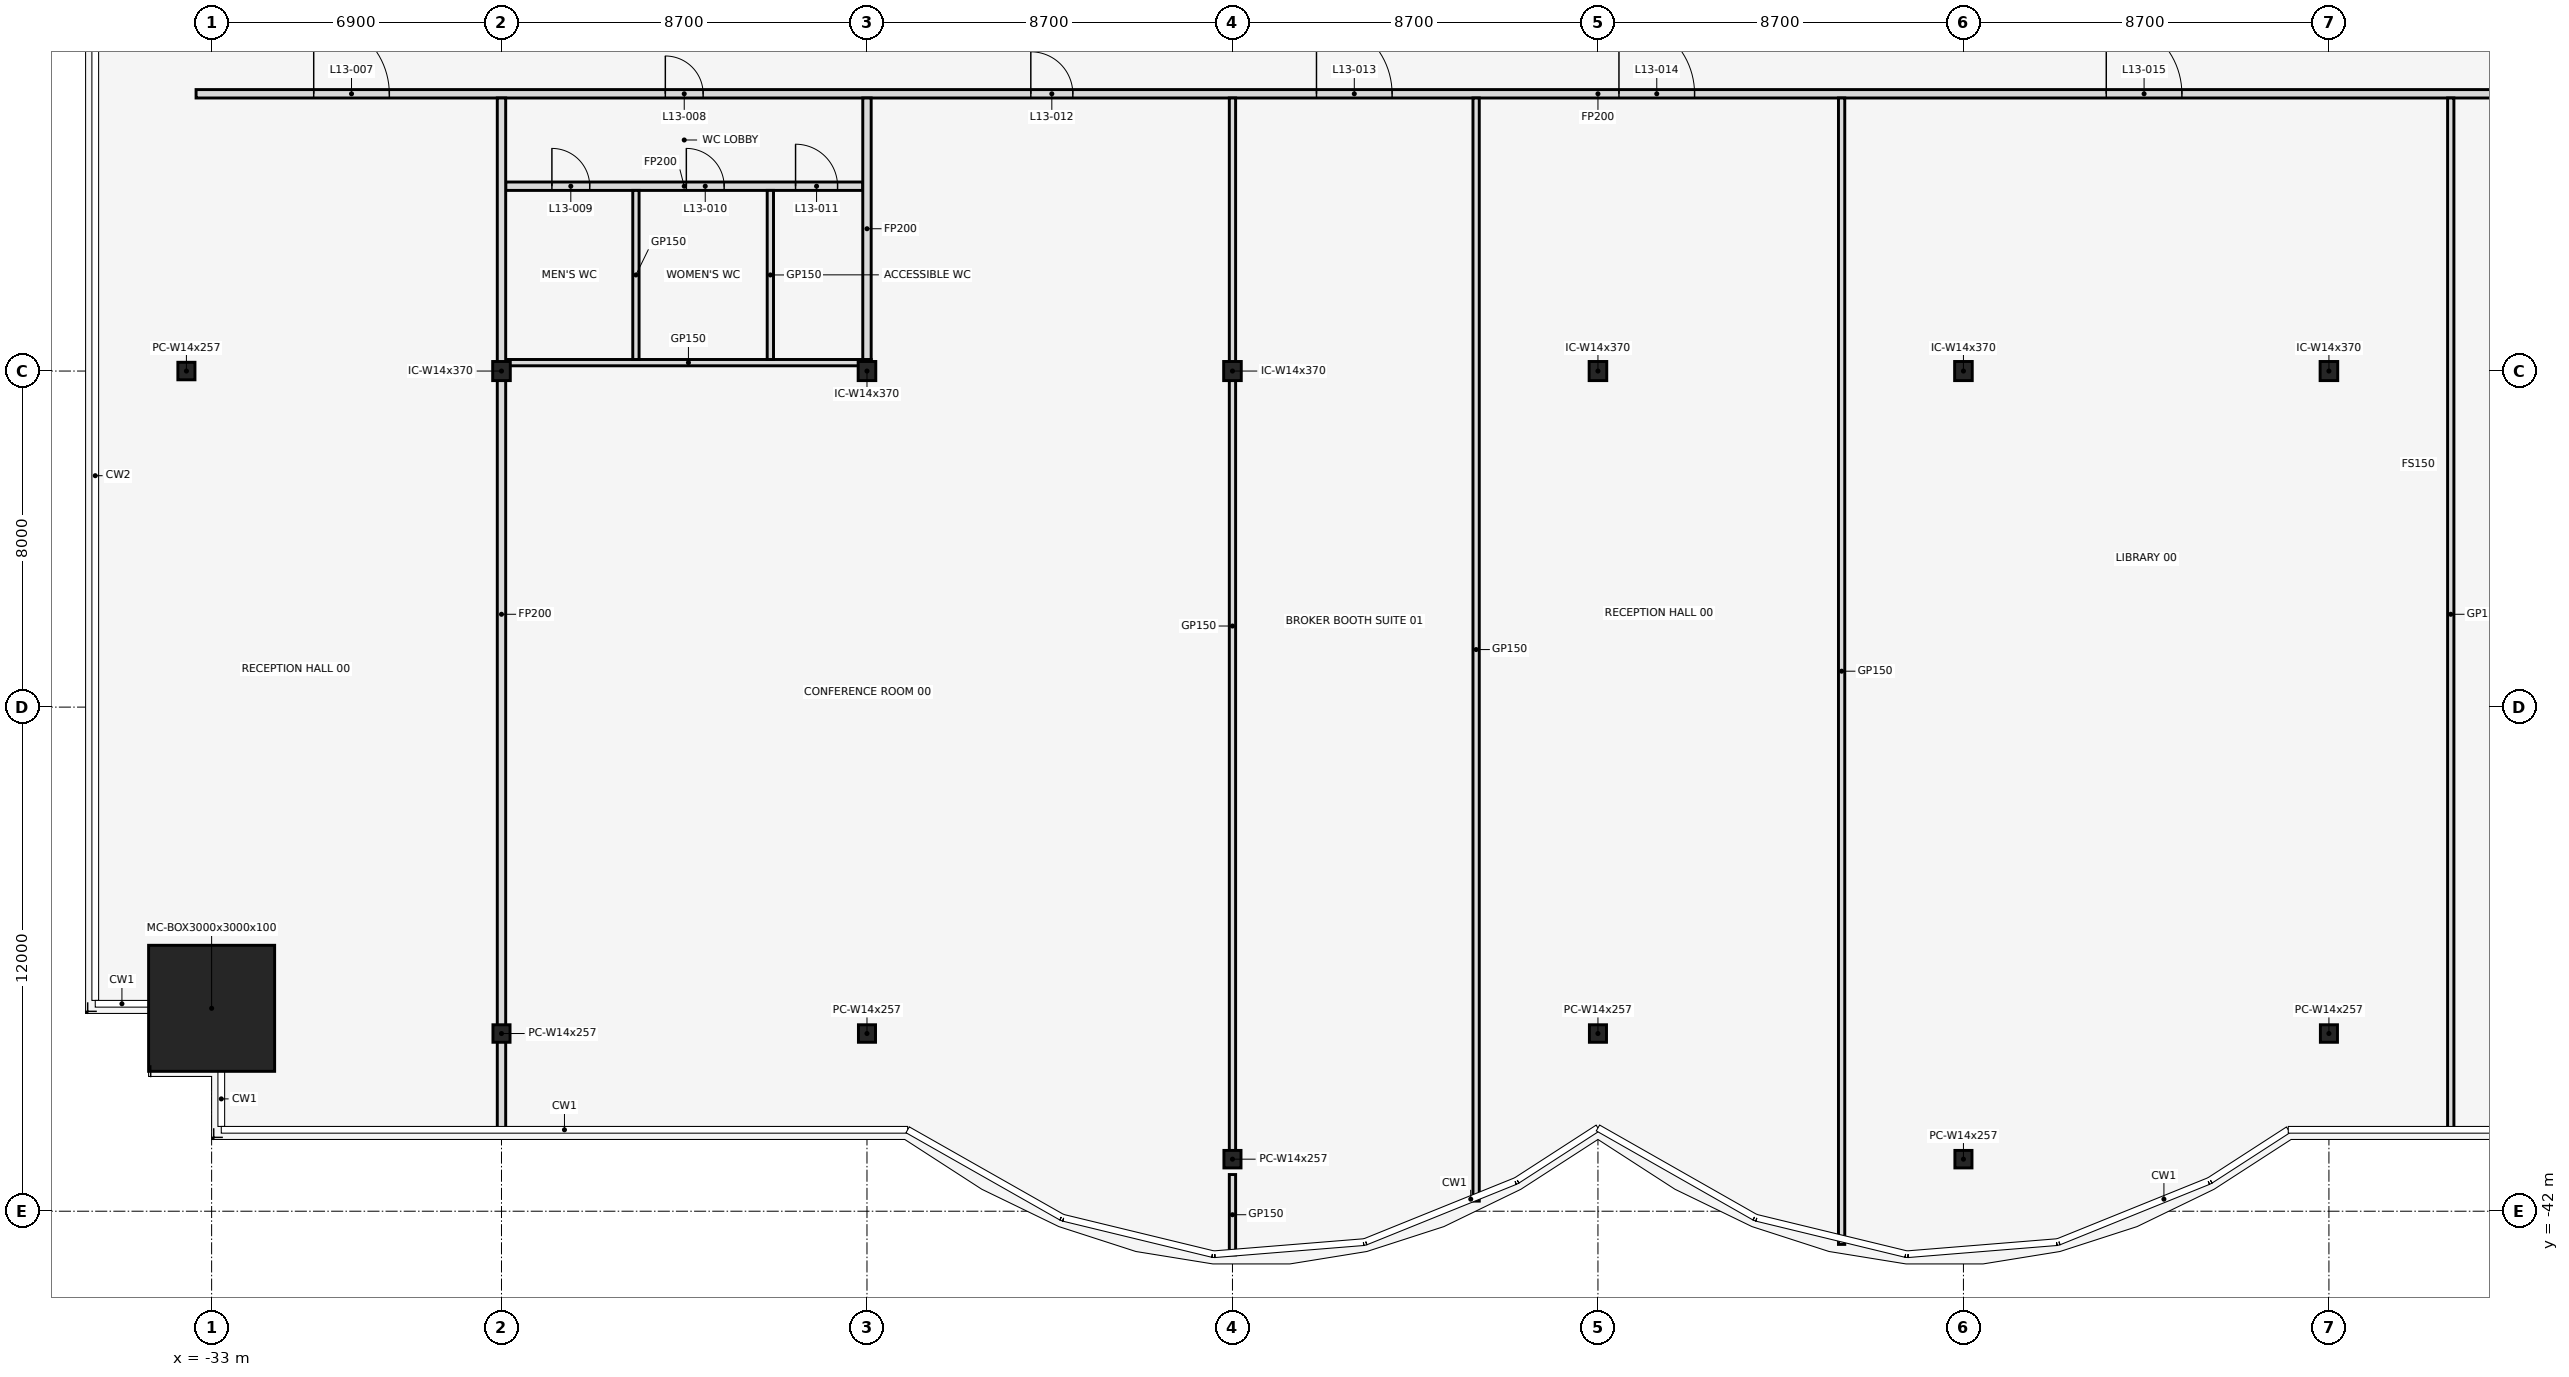
"""IFC4 building model, lengths in metres.
Left out: names, types, materials, properties, quantities, classifications, styles, units other than length and angle.
Written with IfcOpenShell. Run it as: python <this file> out.ifc"""

import sys

from ifc_helpers import new_model, si_unit, direction, frame, frame_2d, origin, origin_2d, place, context, subcontext, project, spatial, rectangle, hollow_rectangle, i_section, extrude, element, fill, save


model = new_model("IFC4")
c1 = context("Model", 3, precision=1e-05, world=origin(), true_north=direction((0.0, 1.0)))
c2 = subcontext(c1, "Body", "Model", "MODEL_VIEW")
j1 = project(units=[si_unit("LENGTHUNIT", "METRE"), si_unit("PLANEANGLEUNIT", "RADIAN")], contexts=[c1])
p1 = place(None, origin())
s1 = spatial("IfcSite", under=j1, at=p1, CompositionType="ELEMENT")
p2 = place(p1, origin())
s2 = spatial("IfcBuilding", under=s1, at=p2, CompositionType="ELEMENT")
p3 = place(p2, frame((0.0, 0.0, 66.5)))
s3 = spatial("IfcBuildingStorey", under=s2, at=p3, CompositionType="ELEMENT", Elevation=66.5)
p4 = place(p3, frame((-33.0, -37.17, 0.0), z_axis=(0.0, 0.0, 1.0), x_axis=(1.0, 0.0, 0.0)))
e1 = element("IfcColumn", 1, at=p4, inside=s3, PredefinedType="COLUMN", context=c2, shape_type="SweptSolid", body=[
    extrude(hollow_rectangle(XDim=3.0, YDim=3.0, WallThickness=0.1, at=origin_2d()), origin(), (0.0, 0.0, 1.0), 4.5),
])
for number, where, z_axis, x_axis in (
    (2, (-26.1, -37.77, 0.0), (0.0, 0.0, 1.0), (1.0, 0.0, 0.0)),
    (3, (-17.4, -37.77, 0.0), (0.0, 0.0, 1.0), (1.0, 0.0, 0.0)),
    (4, (-8.7, -40.761, 0.0), (0.0, 0.0, 1.0), (1.0, 0.0, 0.0)),
    (5, (0.0, -37.77, 0.0), (0.0, 0.0, 1.0), (1.0, 0.0, 0.0)),
    (6, (8.7, -40.761, 0.0), (0.0, 0.0, 1.0), (1.0, 0.0, 0.0)),
    (7, (17.4, -37.77, 0.0), (0.0, 0.0, 1.0), (1.0, 0.0, 0.0)),
    (8, (-33.6, -22.0, 0.0), (0.0, 0.0, 1.0), (1.0, 0.0, 0.0)),
):
    element("IfcColumn", number, at=place(p3, frame(where, z_axis=z_axis, x_axis=x_axis)), inside=s3, PredefinedType="COLUMN", context=c2, shape_type="SweptSolid", body=[
        extrude(i_section(OverallWidth=0.406, OverallDepth=0.417, WebThickness=0.03, FlangeThickness=0.048, at=origin_2d()), origin(), (0.0, 0.0, 1.0), 4.5),
    ])
for number, where, z_axis, x_axis in (
    (9, (-26.1, -22.0, 0.0), (0.0, 0.0, 1.0), (1.0, 0.0, 0.0)),
    (10, (-17.4, -22.0, 0.0), (0.0, 0.0, 1.0), (1.0, 0.0, 0.0)),
    (11, (-8.7, -22.0, 0.0), (0.0, 0.0, 1.0), (1.0, 0.0, 0.0)),
    (12, (0.0, -22.0, 0.0), (0.0, 0.0, 1.0), (1.0, 0.0, 0.0)),
    (13, (8.7, -22.0, 0.0), (0.0, 0.0, 1.0), (1.0, 0.0, 0.0)),
    (14, (17.4, -22.0, 0.0), (0.0, 0.0, 1.0), (1.0, 0.0, 0.0)),
):
    element("IfcColumn", number, at=place(p3, frame(where, z_axis=z_axis, x_axis=x_axis)), inside=s3, PredefinedType="COLUMN", context=c2, shape_type="SweptSolid", body=[
        extrude(i_section(OverallWidth=0.419, OverallDepth=0.455, WebThickness=0.042, FlangeThickness=0.068, at=origin_2d()), origin(), (0.0, 0.0, 1.0), 4.5),
    ])
p5 = place(p3, frame((-26.0, -21.8, 0.0), z_axis=(0.0, 0.0, 1.0), x_axis=(1.0, 0.0, 0.0)))
e15 = element("IfcWall", 15, at=p5, inside=s3, PredefinedType="PARTITIONING", context=c2, shape_type="SweptSolid", body=[
    extrude(rectangle(XDim=8.7, YDim=0.15, at=frame_2d((4.35, 0.0))), origin(), (0.0, 0.0, 1.0), 3.418),
])
p6 = place(p3, frame((-26.0, -17.6, 0.0), z_axis=(0.0, 0.0, 1.0), x_axis=(1.0, 0.0, 0.0)))
e16 = element("IfcWall", 16, at=p6, inside=s3, PredefinedType="PARTITIONING", context=c2, shape_type="SweptSolid", body=[
    extrude(rectangle(XDim=8.5, YDim=0.2, at=frame_2d((4.25, 0.0))), origin(), (0.0, 0.0, 1.0), 3.418),
])
p7 = place(p6, frame((1.1, 0.0, 0.0)))
e17 = element("IfcOpeningElement", 17, at=p7, cuts=e16, PredefinedType="OPENING", context=c2, shape_type="SweptSolid", body=[
    extrude(rectangle(XDim=0.9, YDim=2.1, at=frame_2d((0.45, 1.05))), frame((0.0, 0.112, 0.0), z_axis=(0.0, -1.0, 0.0), x_axis=(1.0, 0.0, 0.0)), (0.0, 0.0, 1.0), 0.224),
])
p8 = place(p6, frame((4.3, 0.0, 0.0)))
e18 = element("IfcOpeningElement", 18, at=p8, cuts=e16, PredefinedType="OPENING", context=c2, shape_type="SweptSolid", body=[
    extrude(rectangle(XDim=0.9, YDim=2.1, at=frame_2d((0.45, 1.05))), frame((0.0, 0.112, 0.0), z_axis=(0.0, -1.0, 0.0), x_axis=(1.0, 0.0, 0.0)), (0.0, 0.0, 1.0), 0.224),
])
p9 = place(p6, frame((6.9, 0.0, 0.0)))
e19 = element("IfcOpeningElement", 19, at=p9, cuts=e16, PredefinedType="OPENING", context=c2, shape_type="SweptSolid", body=[
    extrude(rectangle(XDim=1.0, YDim=2.1, at=frame_2d((0.5, 1.05))), frame((0.0, 0.112, 0.0), z_axis=(0.0, -1.0, 0.0), x_axis=(1.0, 0.0, 0.0)), (0.0, 0.0, 1.0), 0.224),
])
p10 = place(p3, frame((-33.37, -15.4, 0.0), z_axis=(0.0, 0.0, 1.0), x_axis=(1.0, 0.0, 0.0)))
e20 = element("IfcWall", 20, at=p10, inside=s3, PredefinedType="PARTITIONING", context=c2, shape_type="SweptSolid", body=[
    extrude(rectangle(XDim=66.74, YDim=0.2, at=frame_2d((33.37, 0.0))), origin(), (0.0, 0.0, 1.0), 3.418),
])
p11 = place(p10, frame((2.8, 0.0, 0.0)))
e21 = element("IfcOpeningElement", 21, at=p11, cuts=e20, PredefinedType="OPENING", context=c2, shape_type="SweptSolid", body=[
    extrude(rectangle(XDim=1.8, YDim=2.1, at=frame_2d((0.9, 1.05))), frame((0.0, 0.112, 0.0), z_axis=(0.0, -1.0, 0.0), x_axis=(1.0, 0.0, 0.0)), (0.0, 0.0, 1.0), 0.224),
])
p12 = place(p10, frame((11.17, 0.0, 0.0)))
e22 = element("IfcOpeningElement", 22, at=p12, cuts=e20, PredefinedType="OPENING", context=c2, shape_type="SweptSolid", body=[
    extrude(rectangle(XDim=0.9, YDim=2.1, at=frame_2d((0.45, 1.05))), frame((0.0, 0.112, 0.0), z_axis=(0.0, -1.0, 0.0), x_axis=(1.0, 0.0, 0.0)), (0.0, 0.0, 1.0), 0.224),
])
p13 = place(p10, frame((19.87, 0.0, 0.0)))
e23 = element("IfcOpeningElement", 23, at=p13, cuts=e20, PredefinedType="OPENING", context=c2, shape_type="SweptSolid", body=[
    extrude(rectangle(XDim=1.0, YDim=2.1, at=frame_2d((0.5, 1.05))), frame((0.0, 0.112, 0.0), z_axis=(0.0, -1.0, 0.0), x_axis=(1.0, 0.0, 0.0)), (0.0, 0.0, 1.0), 0.224),
])
p14 = place(p10, frame((26.67, 0.0, 0.0)))
e24 = element("IfcOpeningElement", 24, at=p14, cuts=e20, PredefinedType="OPENING", context=c2, shape_type="SweptSolid", body=[
    extrude(rectangle(XDim=1.8, YDim=2.1, at=frame_2d((0.9, 1.05))), frame((0.0, 0.112, 0.0), z_axis=(0.0, -1.0, 0.0), x_axis=(1.0, 0.0, 0.0)), (0.0, 0.0, 1.0), 0.224),
])
p15 = place(p10, frame((33.87, 0.0, 0.0)))
e25 = element("IfcOpeningElement", 25, at=p15, cuts=e20, PredefinedType="OPENING", context=c2, shape_type="SweptSolid", body=[
    extrude(rectangle(XDim=1.8, YDim=2.1, at=frame_2d((0.9, 1.05))), frame((0.0, 0.112, 0.0), z_axis=(0.0, -1.0, 0.0), x_axis=(1.0, 0.0, 0.0)), (0.0, 0.0, 1.0), 0.224),
])
p16 = place(p10, frame((45.47, 0.0, 0.0)))
e26 = element("IfcOpeningElement", 26, at=p16, cuts=e20, PredefinedType="OPENING", context=c2, shape_type="SweptSolid", body=[
    extrude(rectangle(XDim=1.8, YDim=2.1, at=frame_2d((0.9, 1.05))), frame((0.0, 0.112, 0.0), z_axis=(0.0, -1.0, 0.0), x_axis=(1.0, 0.0, 0.0)), (0.0, 0.0, 1.0), 0.224),
])
p17 = place(p10, frame((57.47, 0.0, 0.0)))
e27 = element("IfcOpeningElement", 27, at=p17, cuts=e20, PredefinedType="OPENING", context=c2, shape_type="SweptSolid", body=[
    extrude(rectangle(XDim=1.0, YDim=2.1, at=frame_2d((0.5, 1.05))), frame((0.0, 0.112, 0.0), z_axis=(0.0, -1.0, 0.0), x_axis=(1.0, 0.0, 0.0)), (0.0, 0.0, 1.0), 0.224),
])
p18 = place(p10, frame((63.57, 0.0, 0.0)))
e28 = element("IfcOpeningElement", 28, at=p18, cuts=e20, PredefinedType="OPENING", context=c2, shape_type="SweptSolid", body=[
    extrude(rectangle(XDim=1.8, YDim=2.1, at=frame_2d((0.9, 1.05))), frame((0.0, 0.112, 0.0), z_axis=(0.0, -1.0, 0.0), x_axis=(1.0, 0.0, 0.0)), (0.0, 0.0, 1.0), 0.224),
])
p19 = place(p3, frame((-26.1, -40.08, 0.0), z_axis=(0.0, 0.0, 1.0), x_axis=(0.0, 1.0, 0.0)))
e29 = element("IfcWall", 29, at=p19, inside=s3, PredefinedType="PARTITIONING", context=c2, shape_type="SweptSolid", body=[
    extrude(rectangle(XDim=24.58, YDim=0.2, at=frame_2d((12.29, 0.0))), origin(), (0.0, 0.0, 1.0), 3.418),
])
for number, where, z_axis, x_axis in (
    (30, (-22.9, -21.725, 0.0), (0.0, 0.0, 1.0), (0.0, 1.0, 0.0)),
    (31, (-19.7, -21.725, 0.0), (0.0, 0.0, 1.0), (0.0, 1.0, 0.0)),
):
    element("IfcWall", number, at=place(p3, frame(where, z_axis=z_axis, x_axis=x_axis)), inside=s3, PredefinedType="PARTITIONING", context=c2, shape_type="SweptSolid", body=[
        extrude(rectangle(XDim=4.025, YDim=0.15, at=frame_2d((2.013, 0.0))), origin(), (0.0, 0.0, 1.0), 3.418),
    ])
p20 = place(p3, frame((-17.4, -21.725, 0.0), z_axis=(0.0, 0.0, 1.0), x_axis=(0.0, 1.0, 0.0)))
e32 = element("IfcWall", 32, at=p20, inside=s3, PredefinedType="PARTITIONING", context=c2, shape_type="SweptSolid", body=[
    extrude(rectangle(XDim=6.225, YDim=0.2, at=frame_2d((3.113, 0.0))), origin(), (0.0, 0.0, 1.0), 3.418),
])
p21 = place(p3, frame((-8.7, -43.04, 0.0), z_axis=(0.0, 0.0, 1.0), x_axis=(0.0, 1.0, 0.0)))
e33 = element("IfcWall", 33, at=p21, inside=s3, PredefinedType="PARTITIONING", context=c2, shape_type="SweptSolid", body=[
    extrude(rectangle(XDim=1.913, YDim=0.15, at=frame_2d((0.957, 0.0))), origin(), (0.0, 0.0, 1.0), 3.418),
])
p22 = place(p3, frame((-8.7, -40.639, 0.0), z_axis=(0.0, 0.0, 1.0), x_axis=(0.0, 1.0, 0.0)))
e34 = element("IfcWall", 34, at=p22, inside=s3, PredefinedType="PARTITIONING", context=c2, shape_type="SweptSolid", body=[
    extrude(rectangle(XDim=25.139, YDim=0.15, at=frame_2d((12.57, 0.0))), origin(), (0.0, 0.0, 1.0), 3.418),
])
p23 = place(p3, frame((-2.9, -41.76, 0.0), z_axis=(0.0, 0.0, 1.0), x_axis=(0.0, 1.0, 0.0)))
e35 = element("IfcWall", 35, at=p23, inside=s3, PredefinedType="PARTITIONING", context=c2, shape_type="SweptSolid", body=[
    extrude(rectangle(XDim=26.26, YDim=0.15, at=frame_2d((13.13, 0.0))), origin(), (0.0, 0.0, 1.0), 3.418),
])
p24 = place(p3, frame((5.8, -42.79, 0.0), z_axis=(0.0, 0.0, 1.0), x_axis=(0.0, 1.0, 0.0)))
e36 = element("IfcWall", 36, at=p24, inside=s3, PredefinedType="PARTITIONING", context=c2, shape_type="SweptSolid", body=[
    extrude(rectangle(XDim=27.29, YDim=0.15, at=frame_2d((13.645, 0.0))), origin(), (0.0, 0.0, 1.0), 3.418),
])
p25 = place(p3, frame((20.3, -40.08, 0.0), z_axis=(0.0, 0.0, 1.0), x_axis=(0.0, 1.0, 0.0)))
e37 = element("IfcWall", 37, at=p25, inside=s3, PredefinedType="PARTITIONING", context=c2, shape_type="SweptSolid", body=[
    extrude(rectangle(XDim=24.58, YDim=0.15, at=frame_2d((12.29, 0.0))), origin(), (0.0, 0.0, 1.0), 3.418),
])
p26 = place(p11, origin())
e38 = element("IfcDoor", 38, at=p26, inside=s3, OperationType="SINGLE_SWING_LEFT", PredefinedType="DOOR", context=c2, shape_type="SweptSolid", body=[
    extrude(rectangle(XDim=1.8, YDim=2.1, at=frame_2d((0.9, 1.05))), frame((0.0, 0.025, 0.0), z_axis=(0.0, -1.0, 0.0), x_axis=(1.0, 0.0, 0.0)), (0.0, 0.0, 1.0), 0.05),
])
fill(e21, e38)
p27 = place(p12, frame((0.9, 0.0, 0.0), z_axis=(0.0, 0.0, 1.0), x_axis=(-1.0, 0.0, 0.0)))
e39 = element("IfcDoor", 39, at=p27, inside=s3, OperationType="SINGLE_SWING_RIGHT", PredefinedType="DOOR", context=c2, shape_type="SweptSolid", body=[
    extrude(rectangle(XDim=0.9, YDim=2.1, at=frame_2d((0.45, 1.05))), frame((0.0, 0.025, 0.0), z_axis=(0.0, -1.0, 0.0), x_axis=(1.0, 0.0, 0.0)), (0.0, 0.0, 1.0), 0.05),
])
fill(e22, e39)
p28 = place(p7, frame((0.9, 0.0, 0.0), z_axis=(0.0, 0.0, 1.0), x_axis=(-1.0, 0.0, 0.0)))
e40 = element("IfcDoor", 40, at=p28, inside=s3, OperationType="SINGLE_SWING_RIGHT", PredefinedType="DOOR", context=c2, shape_type="SweptSolid", body=[
    extrude(rectangle(XDim=0.9, YDim=2.1, at=frame_2d((0.45, 1.05))), frame((0.0, 0.025, 0.0), z_axis=(0.0, -1.0, 0.0), x_axis=(1.0, 0.0, 0.0)), (0.0, 0.0, 1.0), 0.05),
])
fill(e17, e40)
p29 = place(p8, frame((0.9, 0.0, 0.0), z_axis=(0.0, 0.0, 1.0), x_axis=(-1.0, 0.0, 0.0)))
e41 = element("IfcDoor", 41, at=p29, inside=s3, OperationType="SINGLE_SWING_LEFT", PredefinedType="DOOR", context=c2, shape_type="SweptSolid", body=[
    extrude(rectangle(XDim=0.9, YDim=2.1, at=frame_2d((0.45, 1.05))), frame((0.0, 0.025, 0.0), z_axis=(0.0, -1.0, 0.0), x_axis=(1.0, 0.0, 0.0)), (0.0, 0.0, 1.0), 0.05),
])
fill(e18, e41)
p30 = place(p9, frame((1.0, 0.0, 0.0), z_axis=(0.0, 0.0, 1.0), x_axis=(-1.0, 0.0, 0.0)))
e42 = element("IfcDoor", 42, at=p30, inside=s3, OperationType="SINGLE_SWING_RIGHT", PredefinedType="DOOR", context=c2, shape_type="SweptSolid", body=[
    extrude(rectangle(XDim=1.0, YDim=2.1, at=frame_2d((0.5, 1.05))), frame((0.0, 0.025, 0.0), z_axis=(0.0, -1.0, 0.0), x_axis=(1.0, 0.0, 0.0)), (0.0, 0.0, 1.0), 0.05),
])
fill(e19, e42)
p31 = place(p13, frame((1.0, 0.0, 0.0), z_axis=(0.0, 0.0, 1.0), x_axis=(-1.0, 0.0, 0.0)))
e43 = element("IfcDoor", 43, at=p31, inside=s3, OperationType="SINGLE_SWING_RIGHT", PredefinedType="DOOR", context=c2, shape_type="SweptSolid", body=[
    extrude(rectangle(XDim=1.0, YDim=2.1, at=frame_2d((0.5, 1.05))), frame((0.0, 0.025, 0.0), z_axis=(0.0, -1.0, 0.0), x_axis=(1.0, 0.0, 0.0)), (0.0, 0.0, 1.0), 0.05),
])
fill(e23, e43)
p32 = place(p14, origin())
e44 = element("IfcDoor", 44, at=p32, inside=s3, OperationType="SINGLE_SWING_LEFT", PredefinedType="DOOR", context=c2, shape_type="SweptSolid", body=[
    extrude(rectangle(XDim=1.8, YDim=2.1, at=frame_2d((0.9, 1.05))), frame((0.0, 0.025, 0.0), z_axis=(0.0, -1.0, 0.0), x_axis=(1.0, 0.0, 0.0)), (0.0, 0.0, 1.0), 0.05),
])
fill(e24, e44)
p33 = place(p15, origin())
e45 = element("IfcDoor", 45, at=p33, inside=s3, OperationType="SINGLE_SWING_LEFT", PredefinedType="DOOR", context=c2, shape_type="SweptSolid", body=[
    extrude(rectangle(XDim=1.8, YDim=2.1, at=frame_2d((0.9, 1.05))), frame((0.0, 0.025, 0.0), z_axis=(0.0, -1.0, 0.0), x_axis=(1.0, 0.0, 0.0)), (0.0, 0.0, 1.0), 0.05),
])
fill(e25, e45)
p34 = place(p16, origin())
e46 = element("IfcDoor", 46, at=p34, inside=s3, OperationType="SINGLE_SWING_LEFT", PredefinedType="DOOR", context=c2, shape_type="SweptSolid", body=[
    extrude(rectangle(XDim=1.8, YDim=2.1, at=frame_2d((0.9, 1.05))), frame((0.0, 0.025, 0.0), z_axis=(0.0, -1.0, 0.0), x_axis=(1.0, 0.0, 0.0)), (0.0, 0.0, 1.0), 0.05),
])
fill(e26, e46)
save(model, sys.argv[1])
